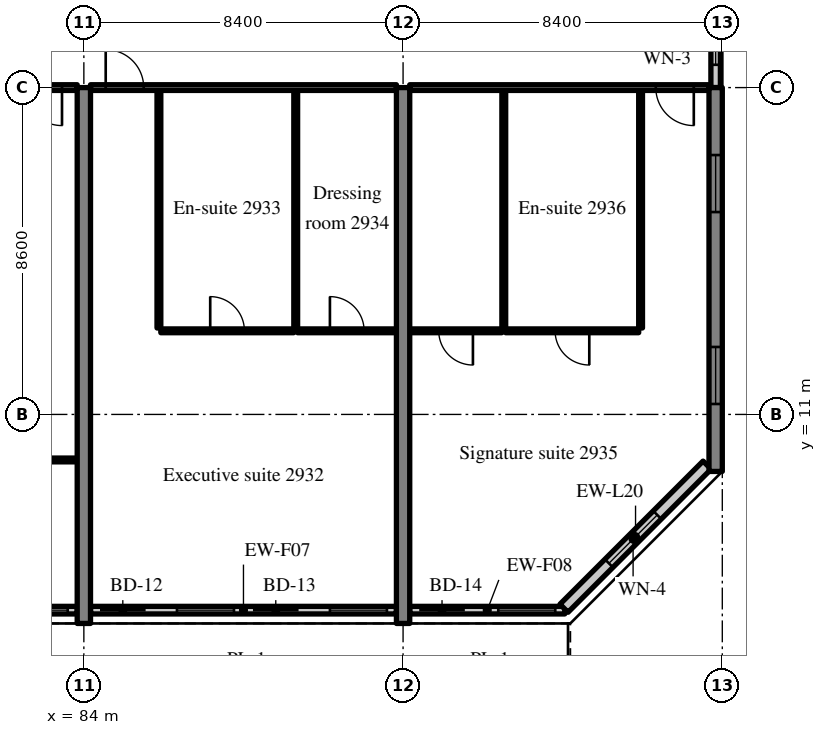
"""IFC4 building model, lengths in metres.
Left out: names, types, materials, properties, quantities, classifications, styles, units other than length and angle.
Written with IfcOpenShell. Run it as: python <this file> out.ifc"""

import sys

from ifc_helpers import new_model, si_unit, direction, frame, frame_2d, origin, place, context, subcontext, project, spatial, rectangle, extrude, source, transform, mapped, element, fill, save


model = new_model("IFC4")
c1 = context("Model", 3, precision=1e-05, world=origin(), true_north=direction((0.0, 1.0)))
c2 = subcontext(c1, "Body", "Model", "MODEL_VIEW")
j1 = project(units=[si_unit("LENGTHUNIT", "METRE"), si_unit("PLANEANGLEUNIT", "RADIAN")], contexts=[c1])
p1 = place(None, origin())
s1 = spatial("IfcSite", under=j1, at=p1, CompositionType="ELEMENT")
p2 = place(p1, origin())
s2 = spatial("IfcBuilding", under=s1, at=p2, CompositionType="ELEMENT")
p3 = place(p2, frame((0.0, 0.0, 121.8)))
s3 = spatial("IfcBuildingStorey", under=s2, at=p3, CompositionType="ELEMENT", Elevation=121.8)
m1 = source(origin(), c2, "Body", "SweptSolid", [
    extrude(rectangle(XDim=14.1, YDim=0.35, at=frame_2d((7.05, 0.0))), origin(), (0.0, 0.0, 1.0), 3.52),
])
for number, where, z_axis, x_axis in (
    (1, (84.0, 5.5, 0.0), (0.0, 0.0, 1.0), (0.0, 1.0, 0.0)),
    (2, (92.4, 5.5, 0.0), (0.0, 0.0, 1.0), (0.0, 1.0, 0.0)),
):
    element("IfcWall", number, at=place(p3, frame(where, z_axis=z_axis, x_axis=x_axis)), inside=s3, PredefinedType="SHEAR", context=c2, shape_type="MappedRepresentation", body=[
        mapped(m1, transform((0.0, 0.0, 0.0), scale=1.0)),
    ])
m2 = source(origin(), c2, "Body", "SweptSolid", [
    extrude(rectangle(XDim=10.1, YDim=0.35, at=frame_2d((5.05, 0.0))), origin(), (0.0, 0.0, 1.0), 3.52),
])
p4 = place(p3, frame((100.625, 9.5, 0.0), z_axis=(0.0, 0.0, 1.0), x_axis=(0.0, 1.0, 0.0)))
e3 = element("IfcWall", 3, at=p4, inside=s3, PredefinedType="SHEAR", context=c2, shape_type="MappedRepresentation", body=[
    mapped(m2, transform((0.0, 0.0, 0.0), scale=1.0)),
])
m3 = source(origin(), c2, "Body", "SweptSolid", [
    extrude(rectangle(XDim=1.5, YDim=1.5, at=frame_2d((0.75, 0.75))), frame((0.0, 0.185, 0.0), z_axis=(0.0, -1.0, 0.0), x_axis=(1.0, 0.0, 0.0)), (0.0, 0.0, 1.0), 0.37),
])
p5 = place(p4, frame((1.775, 0.0, 0.9)))
e4 = element("IfcOpeningElement", 4, at=p5, cuts=e3, PredefinedType="OPENING", context=c2, shape_type="MappedRepresentation", body=[
    mapped(m3, transform((0.0, 0.0, 0.0), scale=1.0)),
])
p6 = place(p4, frame((6.825, 0.0, 0.9)))
e5 = element("IfcOpeningElement", 5, at=p6, cuts=e3, PredefinedType="OPENING", context=c2, shape_type="MappedRepresentation", body=[
    mapped(m3, transform((0.0, 0.0, 0.0), scale=1.0)),
])
m4 = source(origin(), c2, "Body", "SweptSolid", [
    extrude(rectangle(XDim=8.05, YDim=0.2, at=frame_2d((4.025, 0.0))), origin(), (0.0, 0.0, 1.0), 2.82),
])
p7 = place(p3, frame((75.775, 5.85, 0.0), z_axis=(0.0, 0.0, 1.0), x_axis=(1.0, 0.0, 0.0)))
e6 = element("IfcWall", 6, at=p7, inside=s3, PredefinedType="SOLIDWALL", context=c2, shape_type="MappedRepresentation", body=[
    mapped(m4, transform((0.0, 0.0, 0.0), scale=1.0)),
])
m5 = source(origin(), c2, "Body", "SweptSolid", [
    extrude(rectangle(XDim=1.2, YDim=2.4, at=frame_2d((0.6, 1.2))), frame((0.0, 0.11, 0.0), z_axis=(0.0, -1.0, 0.0), x_axis=(1.0, 0.0, 0.0)), (0.0, 0.0, 1.0), 0.22),
])
p8 = place(p7, frame((0.25, 0.0, 0.0)))
e7 = element("IfcOpeningElement", 7, at=p8, cuts=e6, PredefinedType="OPENING", context=c2, shape_type="MappedRepresentation", body=[
    mapped(m5, transform((0.0, 0.0, 0.0), scale=1.0)),
])
m6 = source(origin(), c2, "Body", "SweptSolid", [
    extrude(rectangle(XDim=1.5, YDim=1.5, at=frame_2d((0.75, 0.75))), frame((0.0, 0.11, 0.0), z_axis=(0.0, -1.0, 0.0), x_axis=(1.0, 0.0, 0.0)), (0.0, 0.0, 1.0), 0.22),
])
p9 = place(p7, frame((2.275, 0.0, 0.9)))
e8 = element("IfcOpeningElement", 8, at=p9, cuts=e6, PredefinedType="OPENING", context=c2, shape_type="MappedRepresentation", body=[
    mapped(m6, transform((0.0, 0.0, 0.0), scale=1.0)),
])
p10 = place(p7, frame((4.275, 0.0, 0.0)))
e9 = element("IfcOpeningElement", 9, at=p10, cuts=e6, PredefinedType="OPENING", context=c2, shape_type="MappedRepresentation", body=[
    mapped(m5, transform((0.0, 0.0, 0.0), scale=1.0)),
])
p11 = place(p7, frame((6.3, 0.0, 0.9)))
e10 = element("IfcOpeningElement", 10, at=p11, cuts=e6, PredefinedType="OPENING", context=c2, shape_type="MappedRepresentation", body=[
    mapped(m6, transform((0.0, 0.0, 0.0), scale=1.0)),
])
p12 = place(p3, frame((84.175, 5.85, 0.0), z_axis=(0.0, 0.0, 1.0), x_axis=(1.0, 0.0, 0.0)))
e11 = element("IfcWall", 11, at=p12, inside=s3, PredefinedType="SOLIDWALL", context=c2, shape_type="MappedRepresentation", body=[
    mapped(m4, transform((0.0, 0.0, 0.0), scale=1.0)),
])
p13 = place(p12, frame((0.25, 0.0, 0.0)))
e12 = element("IfcOpeningElement", 12, at=p13, cuts=e11, PredefinedType="OPENING", context=c2, shape_type="MappedRepresentation", body=[
    mapped(m5, transform((0.0, 0.0, 0.0), scale=1.0)),
])
p14 = place(p12, frame((2.275, 0.0, 0.9)))
e13 = element("IfcOpeningElement", 13, at=p14, cuts=e11, PredefinedType="OPENING", context=c2, shape_type="MappedRepresentation", body=[
    mapped(m6, transform((0.0, 0.0, 0.0), scale=1.0)),
])
p15 = place(p12, frame((4.275, 0.0, 0.0)))
e14 = element("IfcOpeningElement", 14, at=p15, cuts=e11, PredefinedType="OPENING", context=c2, shape_type="MappedRepresentation", body=[
    mapped(m5, transform((0.0, 0.0, 0.0), scale=1.0)),
])
p16 = place(p12, frame((6.3, 0.0, 0.9)))
e15 = element("IfcOpeningElement", 15, at=p16, cuts=e11, PredefinedType="OPENING", context=c2, shape_type="MappedRepresentation", body=[
    mapped(m6, transform((0.0, 0.0, 0.0), scale=1.0)),
])
m7 = source(origin(), c2, "Body", "SweptSolid", [
    extrude(rectangle(XDim=4.08, YDim=0.2, at=frame_2d((2.04, 0.0))), origin(), (0.0, 0.0, 1.0), 2.82),
])
p17 = place(p3, frame((92.575, 5.85, 0.0), z_axis=(0.0, 0.0, 1.0), x_axis=(1.0, 0.0, 0.0)))
e16 = element("IfcWall", 16, at=p17, inside=s3, PredefinedType="SOLIDWALL", context=c2, shape_type="MappedRepresentation", body=[
    mapped(m7, transform((0.0, 0.0, 0.0), scale=1.0)),
])
p18 = place(p17, frame((0.25, 0.0, 0.0)))
e17 = element("IfcOpeningElement", 17, at=p18, cuts=e16, PredefinedType="OPENING", context=c2, shape_type="MappedRepresentation", body=[
    mapped(m5, transform((0.0, 0.0, 0.0), scale=1.0)),
])
p19 = place(p17, frame((2.33, 0.0, 0.9)))
e18 = element("IfcOpeningElement", 18, at=p19, cuts=e16, PredefinedType="OPENING", context=c2, shape_type="MappedRepresentation", body=[
    mapped(m6, transform((0.0, 0.0, 0.0), scale=1.0)),
])
m8 = source(origin(), c2, "Body", "SweptSolid", [
    extrude(rectangle(XDim=5.326, YDim=0.3, at=frame_2d((2.663, 0.0))), origin(), (0.0, 0.0, 1.0), 3.52),
])
p20 = place(p3, frame((96.634, 5.9, 0.0), z_axis=(0.0, 0.0, 1.0), x_axis=(0.707083859269, 0.707129702361, 0.0)))
e19 = element("IfcWall", 19, at=p20, inside=s3, PredefinedType="SOLIDWALL", context=c2, shape_type="MappedRepresentation", body=[
    mapped(m8, transform((0.0, 0.0, 0.0), scale=1.0)),
])
m9 = source(origin(), c2, "Body", "SweptSolid", [
    extrude(rectangle(XDim=1.8, YDim=1.5, at=frame_2d((0.9, 0.75))), frame((0.0, 0.16, 0.0), z_axis=(0.0, -1.0, 0.0), x_axis=(1.0, 0.0, 0.0)), (0.0, 0.0, 1.0), 0.32),
])
p21 = place(p20, frame((1.672, 0.0, 0.9)))
e20 = element("IfcOpeningElement", 20, at=p21, cuts=e19, PredefinedType="OPENING", context=c2, shape_type="MappedRepresentation", body=[
    mapped(m9, transform((0.0, 0.0, 0.0), scale=1.0)),
])
m10 = source(origin(), c2, "Body", "SweptSolid", [
    extrude(rectangle(XDim=2.4, YDim=0.25, at=frame_2d((1.2, 0.0))), origin(), (0.0, 0.0, 1.0), 2.62),
])
p22 = place(p3, frame((100.625, 19.6, 0.0), z_axis=(0.0, 0.0, 1.0), x_axis=(0.0, 1.0, 0.0)))
e21 = element("IfcWall", 21, at=p22, inside=s3, PredefinedType="SOLIDWALL", context=c2, shape_type="MappedRepresentation", body=[
    mapped(m10, transform((0.0, 0.0, 0.0), scale=1.0)),
])
m11 = source(origin(), c2, "Body", "SweptSolid", [
    extrude(rectangle(XDim=1.2, YDim=1.5, at=frame_2d((0.6, 0.75))), frame((0.0, 0.135, 0.0), z_axis=(0.0, -1.0, 0.0), x_axis=(1.0, 0.0, 0.0)), (0.0, 0.0, 1.0), 0.27),
])
p23 = place(p22, frame((0.6, 0.0, 0.9)))
e22 = element("IfcOpeningElement", 22, at=p23, cuts=e21, PredefinedType="OPENING", context=c2, shape_type="MappedRepresentation", body=[
    mapped(m11, transform((0.0, 0.0, 0.0), scale=1.0)),
])
m12 = source(origin(), c2, "Body", "SweptSolid", [
    extrude(rectangle(XDim=8.05, YDim=0.1, at=frame_2d((4.025, 0.0))), origin(), (0.0, 0.0, 1.0), 3.52),
])
p24 = place(p3, frame((75.775, 9.802, 0.0), z_axis=(0.0, 0.0, 1.0), x_axis=(1.0, 0.0, 0.0)))
e23 = element("IfcWall", 23, at=p24, inside=s3, PredefinedType="PARTITIONING", context=c2, shape_type="MappedRepresentation", body=[
    mapped(m12, transform((0.0, 0.0, 0.0), scale=1.0)),
])
m13 = source(origin(), c2, "Body", "SweptSolid", [
    extrude(rectangle(XDim=1.8, YDim=2.1, at=frame_2d((0.9, 1.05))), frame((0.0, 0.06, 0.0), z_axis=(0.0, -1.0, 0.0), x_axis=(1.0, 0.0, 0.0)), (0.0, 0.0, 1.0), 0.12),
])
p25 = place(p24, frame((3.125, 0.0, 0.0)))
e24 = element("IfcOpeningElement", 24, at=p25, cuts=e23, PredefinedType="OPENING", context=c2, shape_type="MappedRepresentation", body=[
    mapped(m13, transform((0.0, 0.0, 0.0), scale=1.0)),
])
m14 = source(origin(), c2, "Body", "SweptSolid", [
    extrude(rectangle(XDim=8.05, YDim=0.15, at=frame_2d((4.025, 0.0))), origin(), (0.0, 0.0, 1.0), 2.82),
])
p26 = place(p3, frame((75.775, 19.6, 0.0), z_axis=(0.0, 0.0, 1.0), x_axis=(1.0, 0.0, 0.0)))
e25 = element("IfcWall", 25, at=p26, inside=s3, PredefinedType="PARTITIONING", context=c2, shape_type="MappedRepresentation", body=[
    mapped(m14, transform((0.0, 0.0, 0.0), scale=1.0)),
])
m15 = source(origin(), c2, "Body", "SweptSolid", [
    extrude(rectangle(XDim=1.0, YDim=2.1, at=frame_2d((0.5, 1.05))), frame((0.0, 0.085, 0.0), z_axis=(0.0, -1.0, 0.0), x_axis=(1.0, 0.0, 0.0)), (0.0, 0.0, 1.0), 0.17),
])
p27 = place(p26, frame((6.65, 0.0, 0.0)))
e26 = element("IfcOpeningElement", 26, at=p27, cuts=e25, PredefinedType="OPENING", context=c2, shape_type="MappedRepresentation", body=[
    mapped(m15, transform((0.0, 0.0, 0.0), scale=1.0)),
])
m16 = source(origin(), c2, "Body", "SweptSolid", [
    extrude(rectangle(XDim=6.25, YDim=0.1, at=frame_2d((3.125, 0.0))), origin(), (0.0, 0.0, 1.0), 3.52),
])
for number, where, z_axis, x_axis in (
    (27, (85.975, 13.275, 0.0), (0.0, 0.0, 1.0), (0.0, 1.0, 0.0)),
    (28, (89.575, 13.275, 0.0), (0.0, 0.0, 1.0), (0.0, 1.0, 0.0)),
):
    element("IfcWall", number, at=place(p3, frame(where, z_axis=z_axis, x_axis=x_axis)), inside=s3, PredefinedType="PARTITIONING", context=c2, shape_type="MappedRepresentation", body=[
        mapped(m16, transform((0.0, 0.0, 0.0), scale=1.0)),
    ])
m17 = source(origin(), c2, "Body", "SweptSolid", [
    extrude(rectangle(XDim=3.5, YDim=0.1, at=frame_2d((1.75, 0.0))), origin(), (0.0, 0.0, 1.0), 3.52),
])
p28 = place(p3, frame((86.025, 13.2, 0.0), z_axis=(0.0, 0.0, 1.0), x_axis=(1.0, 0.0, 0.0)))
e29 = element("IfcWall", 29, at=p28, inside=s3, PredefinedType="PARTITIONING", context=c2, shape_type="MappedRepresentation", body=[
    mapped(m17, transform((0.0, 0.0, 0.0), scale=1.0)),
])
m18 = source(origin(), c2, "Body", "SweptSolid", [
    extrude(rectangle(XDim=0.9, YDim=2.1, at=frame_2d((0.45, 1.05))), frame((0.0, 0.06, 0.0), z_axis=(0.0, -1.0, 0.0), x_axis=(1.0, 0.0, 0.0)), (0.0, 0.0, 1.0), 0.12),
])
p29 = place(p28, frame((1.3, 0.0, 0.0)))
e30 = element("IfcOpeningElement", 30, at=p29, cuts=e29, PredefinedType="OPENING", context=c2, shape_type="MappedRepresentation", body=[
    mapped(m18, transform((0.0, 0.0, 0.0), scale=1.0)),
])
m19 = source(origin(), c2, "Body", "SweptSolid", [
    extrude(rectangle(XDim=2.6, YDim=0.1, at=frame_2d((1.3, 0.0))), origin(), (0.0, 0.0, 1.0), 3.52),
])
p30 = place(p3, frame((89.625, 13.2, 0.0), z_axis=(0.0, 0.0, 1.0), x_axis=(1.0, 0.0, 0.0)))
e31 = element("IfcWall", 31, at=p30, inside=s3, PredefinedType="PARTITIONING", context=c2, shape_type="MappedRepresentation", body=[
    mapped(m19, transform((0.0, 0.0, 0.0), scale=1.0)),
])
p31 = place(p30, frame((0.85, 0.0, 0.0)))
e32 = element("IfcOpeningElement", 32, at=p31, cuts=e31, PredefinedType="OPENING", context=c2, shape_type="MappedRepresentation", body=[
    mapped(m18, transform((0.0, 0.0, 0.0), scale=1.0)),
])
p32 = place(p3, frame((84.175, 19.6, 0.0), z_axis=(0.0, 0.0, 1.0), x_axis=(1.0, 0.0, 0.0)))
e33 = element("IfcWall", 33, at=p32, inside=s3, PredefinedType="PARTITIONING", context=c2, shape_type="MappedRepresentation", body=[
    mapped(m14, transform((0.0, 0.0, 0.0), scale=1.0)),
])
p33 = place(p32, frame((0.4, 0.0, 0.0)))
e34 = element("IfcOpeningElement", 34, at=p33, cuts=e33, PredefinedType="OPENING", context=c2, shape_type="MappedRepresentation", body=[
    mapped(m15, transform((0.0, 0.0, 0.0), scale=1.0)),
])
for number, where, z_axis, x_axis in (
    (35, (98.65, 13.275, 0.0), (0.0, 0.0, 1.0), (0.0, 1.0, 0.0)),
    (36, (95.05, 13.275, 0.0), (0.0, 0.0, 1.0), (0.0, 1.0, 0.0)),
):
    element("IfcWall", number, at=place(p3, frame(where, z_axis=z_axis, x_axis=x_axis)), inside=s3, PredefinedType="PARTITIONING", context=c2, shape_type="MappedRepresentation", body=[
        mapped(m16, transform((0.0, 0.0, 0.0), scale=1.0)),
    ])
p34 = place(p3, frame((95.1, 13.2, 0.0), z_axis=(0.0, 0.0, 1.0), x_axis=(1.0, 0.0, 0.0)))
e37 = element("IfcWall", 37, at=p34, inside=s3, PredefinedType="PARTITIONING", context=c2, shape_type="MappedRepresentation", body=[
    mapped(m17, transform((0.0, 0.0, 0.0), scale=1.0)),
])
p35 = place(p34, frame((1.3, 0.0, 0.0)))
e38 = element("IfcOpeningElement", 38, at=p35, cuts=e37, PredefinedType="OPENING", context=c2, shape_type="MappedRepresentation", body=[
    mapped(m18, transform((0.0, 0.0, 0.0), scale=1.0)),
])
m20 = source(origin(), c2, "Body", "SweptSolid", [
    extrude(rectangle(XDim=2.425, YDim=0.1, at=frame_2d((1.212, 0.0))), origin(), (0.0, 0.0, 1.0), 3.52),
])
p36 = place(p3, frame((92.575, 13.2, 0.0), z_axis=(0.0, 0.0, 1.0), x_axis=(1.0, 0.0, 0.0)))
e39 = element("IfcWall", 39, at=p36, inside=s3, PredefinedType="PARTITIONING", context=c2, shape_type="MappedRepresentation", body=[
    mapped(m20, transform((0.0, 0.0, 0.0), scale=1.0)),
])
p37 = place(p36, frame((0.763, 0.0, 0.0)))
e40 = element("IfcOpeningElement", 40, at=p37, cuts=e39, PredefinedType="OPENING", context=c2, shape_type="MappedRepresentation", body=[
    mapped(m18, transform((0.0, 0.0, 0.0), scale=1.0)),
])
m21 = source(origin(), c2, "Body", "SweptSolid", [
    extrude(rectangle(XDim=7.875, YDim=0.15, at=frame_2d((3.938, 0.0))), origin(), (0.0, 0.0, 1.0), 2.82),
])
p38 = place(p3, frame((92.575, 19.6, 0.0), z_axis=(0.0, 0.0, 1.0), x_axis=(1.0, 0.0, 0.0)))
e41 = element("IfcWall", 41, at=p38, inside=s3, PredefinedType="PARTITIONING", context=c2, shape_type="MappedRepresentation", body=[
    mapped(m21, transform((0.0, 0.0, 0.0), scale=1.0)),
])
p39 = place(p38, frame((6.475, 0.0, 0.0)))
e42 = element("IfcOpeningElement", 42, at=p39, cuts=e41, PredefinedType="OPENING", context=c2, shape_type="MappedRepresentation", body=[
    mapped(m15, transform((0.0, 0.0, 0.0), scale=1.0)),
])
m22 = source(origin(), c2, "Body", "SweptSolid", [
    extrude(rectangle(XDim=1.5, YDim=1.5, at=frame_2d((0.75, 0.75))), frame((0.0, 0.03, 0.0), z_axis=(0.0, -1.0, 0.0), x_axis=(1.0, 0.0, 0.0)), (0.0, 0.0, 1.0), 0.06),
])
p40 = place(p11, origin())
e43 = element("IfcWindow", 43, at=p40, inside=s3, PartitioningType="SINGLE_PANEL", PredefinedType="WINDOW", context=c2, shape_type="MappedRepresentation", body=[
    mapped(m22, transform((0.0, 0.0, 0.0), scale=1.0)),
])
fill(e10, e43)
m23 = source(origin(), c2, "Body", "SweptSolid", [
    extrude(rectangle(XDim=1.2, YDim=2.4, at=frame_2d((0.6, 1.2))), frame((0.0, 0.025, 0.0), z_axis=(0.0, -1.0, 0.0), x_axis=(1.0, 0.0, 0.0)), (0.0, 0.0, 1.0), 0.05),
])
p41 = place(p13, origin())
e44 = element("IfcDoor", 44, at=p41, inside=s3, OperationType="SLIDING_TO_RIGHT", PredefinedType="DOOR", context=c2, shape_type="MappedRepresentation", body=[
    mapped(m23, transform((0.0, 0.0, 0.0), scale=1.0)),
])
fill(e12, e44)
p42 = place(p14, origin())
e45 = element("IfcWindow", 45, at=p42, inside=s3, PartitioningType="SINGLE_PANEL", PredefinedType="WINDOW", context=c2, shape_type="MappedRepresentation", body=[
    mapped(m22, transform((0.0, 0.0, 0.0), scale=1.0)),
])
fill(e13, e45)
p43 = place(p15, origin())
e46 = element("IfcDoor", 46, at=p43, inside=s3, OperationType="SLIDING_TO_LEFT", PredefinedType="DOOR", context=c2, shape_type="MappedRepresentation", body=[
    mapped(m23, transform((0.0, 0.0, 0.0), scale=1.0)),
])
fill(e14, e46)
p44 = place(p16, origin())
e47 = element("IfcWindow", 47, at=p44, inside=s3, PartitioningType="SINGLE_PANEL", PredefinedType="WINDOW", context=c2, shape_type="MappedRepresentation", body=[
    mapped(m22, transform((0.0, 0.0, 0.0), scale=1.0)),
])
fill(e15, e47)
p45 = place(p18, origin())
e48 = element("IfcDoor", 48, at=p45, inside=s3, OperationType="SLIDING_TO_RIGHT", PredefinedType="DOOR", context=c2, shape_type="MappedRepresentation", body=[
    mapped(m23, transform((0.0, 0.0, 0.0), scale=1.0)),
])
fill(e17, e48)
p46 = place(p19, origin())
e49 = element("IfcWindow", 49, at=p46, inside=s3, PartitioningType="SINGLE_PANEL", PredefinedType="WINDOW", context=c2, shape_type="MappedRepresentation", body=[
    mapped(m22, transform((0.0, 0.0, 0.0), scale=1.0)),
])
fill(e18, e49)
m24 = source(origin(), c2, "Body", "SweptSolid", [
    extrude(rectangle(XDim=1.8, YDim=1.5, at=frame_2d((0.9, 0.75))), frame((0.0, 0.03, 0.0), z_axis=(0.0, -1.0, 0.0), x_axis=(1.0, 0.0, 0.0)), (0.0, 0.0, 1.0), 0.06),
])
p47 = place(p21, origin())
e50 = element("IfcWindow", 50, at=p47, inside=s3, PartitioningType="SINGLE_PANEL", PredefinedType="WINDOW", context=c2, shape_type="MappedRepresentation", body=[
    mapped(m24, transform((0.0, 0.0, 0.0), scale=1.0)),
])
fill(e20, e50)
p48 = place(p5, origin())
e51 = element("IfcWindow", 51, at=p48, inside=s3, PartitioningType="SINGLE_PANEL", PredefinedType="WINDOW", context=c2, shape_type="MappedRepresentation", body=[
    mapped(m22, transform((0.0, 0.0, 0.0), scale=1.0)),
])
fill(e4, e51)
p49 = place(p6, origin())
e52 = element("IfcWindow", 52, at=p49, inside=s3, PartitioningType="SINGLE_PANEL", PredefinedType="WINDOW", context=c2, shape_type="MappedRepresentation", body=[
    mapped(m22, transform((0.0, 0.0, 0.0), scale=1.0)),
])
fill(e5, e52)
m25 = source(origin(), c2, "Body", "SweptSolid", [
    extrude(rectangle(XDim=1.2, YDim=1.5, at=frame_2d((0.6, 0.75))), frame((0.0, 0.03, 0.0), z_axis=(0.0, -1.0, 0.0), x_axis=(1.0, 0.0, 0.0)), (0.0, 0.0, 1.0), 0.06),
])
p50 = place(p23, origin())
e53 = element("IfcWindow", 53, at=p50, inside=s3, PartitioningType="SINGLE_PANEL", PredefinedType="WINDOW", context=c2, shape_type="MappedRepresentation", body=[
    mapped(m25, transform((0.0, 0.0, 0.0), scale=1.0)),
])
fill(e22, e53)
m26 = source(origin(), c2, "Body", "SweptSolid", [
    extrude(rectangle(XDim=1.0, YDim=2.1, at=frame_2d((0.5, 1.05))), frame((0.0, 0.025, 0.0), z_axis=(0.0, -1.0, 0.0), x_axis=(1.0, 0.0, 0.0)), (0.0, 0.0, 1.0), 0.05),
])
p51 = place(p27, origin())
e54 = element("IfcDoor", 54, at=p51, inside=s3, OperationType="SINGLE_SWING_RIGHT", PredefinedType="DOOR", context=c2, shape_type="MappedRepresentation", body=[
    mapped(m26, transform((0.0, 0.0, 0.0), scale=1.0)),
])
fill(e26, e54)
m27 = source(origin(), c2, "Body", "SweptSolid", [
    extrude(rectangle(XDim=0.9, YDim=2.1, at=frame_2d((0.45, 1.05))), frame((0.0, 0.025, 0.0), z_axis=(0.0, -1.0, 0.0), x_axis=(1.0, 0.0, 0.0)), (0.0, 0.0, 1.0), 0.05),
])
p52 = place(p29, origin())
e55 = element("IfcDoor", 55, at=p52, inside=s3, OperationType="SINGLE_SWING_LEFT", PredefinedType="DOOR", context=c2, shape_type="MappedRepresentation", body=[
    mapped(m27, transform((0.0, 0.0, 0.0), scale=1.0)),
])
fill(e30, e55)
p53 = place(p31, origin())
e56 = element("IfcDoor", 56, at=p53, inside=s3, OperationType="SINGLE_SWING_LEFT", PredefinedType="DOOR", context=c2, shape_type="MappedRepresentation", body=[
    mapped(m27, transform((0.0, 0.0, 0.0), scale=1.0)),
])
fill(e32, e56)
p54 = place(p33, origin())
e57 = element("IfcDoor", 57, at=p54, inside=s3, OperationType="SINGLE_SWING_LEFT", PredefinedType="DOOR", context=c2, shape_type="MappedRepresentation", body=[
    mapped(m26, transform((0.0, 0.0, 0.0), scale=1.0)),
])
fill(e34, e57)
p55 = place(p35, origin())
e58 = element("IfcDoor", 58, at=p55, inside=s3, OperationType="SINGLE_SWING_RIGHT", PredefinedType="DOOR", context=c2, shape_type="MappedRepresentation", body=[
    mapped(m27, transform((0.0, 0.0, 0.0), scale=1.0)),
])
fill(e38, e58)
p56 = place(p37, origin())
e59 = element("IfcDoor", 59, at=p56, inside=s3, OperationType="SINGLE_SWING_RIGHT", PredefinedType="DOOR", context=c2, shape_type="MappedRepresentation", body=[
    mapped(m27, transform((0.0, 0.0, 0.0), scale=1.0)),
])
fill(e40, e59)
p57 = place(p39, origin())
e60 = element("IfcDoor", 60, at=p57, inside=s3, OperationType="SINGLE_SWING_RIGHT", PredefinedType="DOOR", context=c2, shape_type="MappedRepresentation", body=[
    mapped(m26, transform((0.0, 0.0, 0.0), scale=1.0)),
])
fill(e42, e60)
save(model, sys.argv[1])
